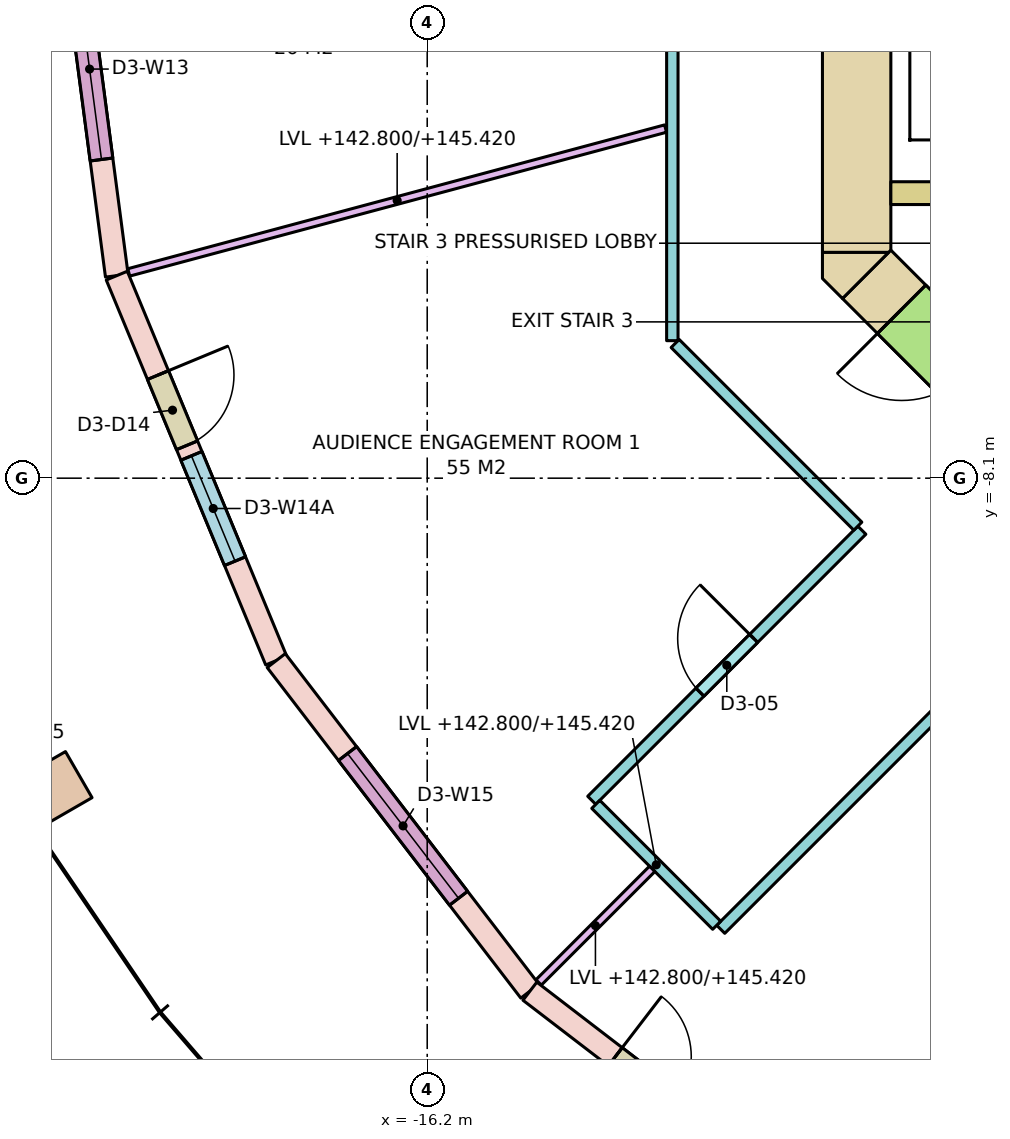
"""IFC4 building model, lengths in metres.
Left out: names, types, materials, properties, quantities, classifications, styles, units other than length and angle.
Written with IfcOpenShell. Run it as: python <this file> out.ifc"""

import sys

from ifc_helpers import new_model, si_unit, direction, frame, frame_2d, origin, origin_2d, place, context, subcontext, project, spatial, polyline, rectangle, outline, extrude, element, fill, save


model = new_model("IFC4")
c1 = context("Model", 3, precision=1e-05, world=origin(), true_north=direction((0.0, 1.0)))
c2 = subcontext(c1, "Body", "Model", "MODEL_VIEW")
j1 = project(units=[si_unit("LENGTHUNIT", "METRE"), si_unit("PLANEANGLEUNIT", "RADIAN")], contexts=[c1])
p1 = place(None, origin())
s1 = spatial("IfcSite", under=j1, at=p1, CompositionType="ELEMENT")
p2 = place(p1, origin())
s2 = spatial("IfcBuilding", under=s1, at=p2, CompositionType="ELEMENT")
p3 = place(p2, frame((0.0, 0.0, 142.8)))
s3 = spatial("IfcBuildingStorey", under=s2, at=p3, CompositionType="ELEMENT", Elevation=142.8)
p4 = place(p3, frame((-21.218, -12.25, 0.0), z_axis=(0.0, 0.0, 1.0), x_axis=(0.5, -0.866025403784, 0.0)))
e1 = element("IfcColumn", 1, at=p4, inside=s3, PredefinedType="COLUMN", context=c2, shape_type="SweptSolid", body=[
    extrude(rectangle(XDim=0.7, YDim=1.0, at=origin_2d()), origin(), (0.0, 0.0, 1.0), 3.8),
])
p5 = place(p3, frame((-10.55, -5.13, -0.28), z_axis=(0.0, 0.0, 1.0), x_axis=(0.0, 1.0, 0.0)))
e2 = element("IfcWall", 2, at=p5, inside=s3, PredefinedType="SHEAR", context=c2, shape_type="SweptSolid", body=[
    extrude(rectangle(XDim=10.26, YDim=0.9, at=frame_2d((5.13, 0.0))), origin(), (0.0, 0.0, 1.0), 3.8),
])
p6 = place(p5, frame((4.13, 0.0, 0.28)))
e3 = element("IfcOpeningElement", 3, at=p6, cuts=e2, PredefinedType="OPENING", context=c2, shape_type="SweptSolid", body=[
    extrude(rectangle(XDim=2.0, YDim=2.1, at=frame_2d((1.0, 1.05))), frame((0.0, 0.46, 0.0), z_axis=(0.0, -1.0, 0.0), x_axis=(1.0, 0.0, 0.0)), (0.0, 0.0, 1.0), 0.92),
])
p7 = place(p3, frame((-7.418, -8.418, -0.28), z_axis=(0.0, 0.0, 1.0), x_axis=(-0.707106781187, 0.707106781187, 0.0)))
e4 = element("IfcWall", 4, at=p7, inside=s3, PredefinedType="SHEAR", context=c2, shape_type="SweptSolid", body=[
    extrude(rectangle(XDim=4.243, YDim=0.9, at=frame_2d((2.121, 0.0))), origin(), (0.0, 0.0, 1.0), 3.8),
])
p8 = place(p7, frame((2.393, 0.0, 0.28)))
e5 = element("IfcOpeningElement", 5, at=p8, cuts=e4, PredefinedType="OPENING", context=c2, shape_type="SweptSolid", body=[
    extrude(rectangle(XDim=1.2, YDim=2.1, at=frame_2d((0.6, 1.05))), frame((0.0, 0.46, 0.0), z_axis=(0.0, -1.0, 0.0), x_axis=(1.0, 0.0, 0.0)), (0.0, 0.0, 1.0), 0.92),
])
p9 = place(p3, frame((0.0, 0.0, -0.28)))
e6 = element("IfcWall", 6, at=p9, inside=s3, PredefinedType="SHEAR", context=c2, shape_type="SweptSolid", body=[
    extrude(outline(polyline([(-11.0, -5.473), (-11.0, -5.13), (-10.13, -5.13), (-10.736, -5.736), (-11.0, -5.473)])), origin(), (0.0, 0.0, 1.0), 3.8),
])
p10 = place(p3, frame((-10.1, -4.35, 0.0), z_axis=(0.0, 0.0, 1.0), x_axis=(1.0, 0.0, 0.0)))
e7 = element("IfcWall", 7, at=p10, inside=s3, PredefinedType="SOLIDWALL", context=c2, shape_type="SweptSolid", body=[
    extrude(rectangle(XDim=8.1, YDim=0.3, at=frame_2d((4.05, 0.0))), origin(), (0.0, 0.0, 1.0), 3.52),
])
p11 = place(p3, frame((-21.0, 0.0, 0.0), z_axis=(0.0, 0.0, 1.0), x_axis=(0.130527087244, -0.991444743541, 0.0)))
e8 = element("IfcWall", 8, at=p11, inside=s3, PredefinedType="STANDARD", context=c2, shape_type="SweptSolid", body=[
    extrude(rectangle(XDim=5.482, YDim=0.3, at=frame_2d((2.741, 0.0))), origin(), (0.0, 0.0, 1.0), 3.52),
])
p12 = place(p11, frame((1.541, 0.0, 0.8)))
e9 = element("IfcOpeningElement", 9, at=p12, cuts=e8, PredefinedType="OPENING", context=c2, shape_type="SweptSolid", body=[
    extrude(rectangle(XDim=2.4, YDim=2.5, at=frame_2d((1.2, 1.25))), frame((0.0, 0.16, 0.0), z_axis=(0.0, -1.0, 0.0), x_axis=(1.0, 0.0, 0.0)), (0.0, 0.0, 1.0), 0.32),
])
p13 = place(p3, frame((-20.284, -5.435, 0.0), z_axis=(0.0, 0.0, 1.0), x_axis=(0.382688740813, -0.923877333662, 0.0)))
e10 = element("IfcWall", 10, at=p13, inside=s3, PredefinedType="STANDARD", context=c2, shape_type="SweptSolid", body=[
    extrude(rectangle(XDim=5.482, YDim=0.3, at=frame_2d((2.741, 0.0))), origin(), (0.0, 0.0, 1.0), 3.52),
])
p14 = place(p13, frame((1.416, 0.0, 0.0)))
e11 = element("IfcOpeningElement", 11, at=p14, cuts=e10, PredefinedType="OPENING", context=c2, shape_type="SweptSolid", body=[
    extrude(rectangle(XDim=1.0, YDim=2.4, at=frame_2d((0.5, 1.2))), frame((0.0, 0.16, 0.0), z_axis=(0.0, -1.0, 0.0), x_axis=(1.0, 0.0, 0.0)), (0.0, 0.0, 1.0), 0.32),
])
p15 = place(p13, frame((2.566, 0.0, 0.8)))
e12 = element("IfcOpeningElement", 12, at=p15, cuts=e10, PredefinedType="OPENING", context=c2, shape_type="SweptSolid", body=[
    extrude(rectangle(XDim=1.5, YDim=2.5, at=frame_2d((0.75, 1.25))), frame((0.0, 0.16, 0.0), z_axis=(0.0, -1.0, 0.0), x_axis=(1.0, 0.0, 0.0)), (0.0, 0.0, 1.0), 0.32),
])
p16 = place(p3, frame((-18.187, -10.5, 0.0), z_axis=(0.0, 0.0, 1.0), x_axis=(0.608784891166, -0.793335336593, 0.0)))
e13 = element("IfcWall", 13, at=p16, inside=s3, PredefinedType="STANDARD", context=c2, shape_type="SweptSolid", body=[
    extrude(rectangle(XDim=5.482, YDim=0.3, at=frame_2d((2.741, 0.0))), origin(), (0.0, 0.0, 1.0), 3.52),
])
p17 = place(p16, frame((1.541, 0.0, 0.8)))
e14 = element("IfcOpeningElement", 14, at=p17, cuts=e13, PredefinedType="OPENING", context=c2, shape_type="SweptSolid", body=[
    extrude(rectangle(XDim=2.4, YDim=2.5, at=frame_2d((1.2, 1.25))), frame((0.0, 0.16, 0.0), z_axis=(0.0, -1.0, 0.0), x_axis=(1.0, 0.0, 0.0)), (0.0, 0.0, 1.0), 0.32),
])
p18 = place(p3, frame((-14.849, -14.849, 0.0), z_axis=(0.0, 0.0, 1.0), x_axis=(0.793335336593, -0.608784891166, 0.0)))
e15 = element("IfcWall", 15, at=p18, inside=s3, PredefinedType="STANDARD", context=c2, shape_type="SweptSolid", body=[
    extrude(rectangle(XDim=5.482, YDim=0.3, at=frame_2d((2.741, 0.0))), origin(), (0.0, 0.0, 1.0), 3.52),
])
p19 = place(p18, frame((1.416, 0.0, 0.0)))
e16 = element("IfcOpeningElement", 16, at=p19, cuts=e15, PredefinedType="OPENING", context=c2, shape_type="SweptSolid", body=[
    extrude(rectangle(XDim=1.0, YDim=2.4, at=frame_2d((0.5, 1.2))), frame((0.0, 0.16, 0.0), z_axis=(0.0, -1.0, 0.0), x_axis=(1.0, 0.0, 0.0)), (0.0, 0.0, 1.0), 0.32),
])
p20 = place(p18, frame((2.566, 0.0, 0.8)))
e17 = element("IfcOpeningElement", 17, at=p20, cuts=e15, PredefinedType="OPENING", context=c2, shape_type="SweptSolid", body=[
    extrude(rectangle(XDim=1.5, YDim=2.5, at=frame_2d((0.75, 1.25))), frame((0.0, 0.16, 0.0), z_axis=(0.0, -1.0, 0.0), x_axis=(1.0, 0.0, 0.0)), (0.0, 0.0, 1.0), 0.32),
])
p21 = place(p3, frame((-14.035, -12.338, 0.0), z_axis=(0.0, 0.0, 1.0), x_axis=(0.707106781187, 0.707106781187, 0.0)))
e18 = element("IfcWall", 18, at=p21, inside=s3, PredefinedType="PARTITIONING", context=c2, shape_type="SweptSolid", body=[
    extrude(rectangle(XDim=5.026, YDim=0.15, at=frame_2d((2.513, 0.0))), origin(), (0.0, 0.0, 1.0), 3.52),
])
p22 = place(p21, frame((2.013, 0.0, 0.0)))
e19 = element("IfcOpeningElement", 19, at=p22, cuts=e18, PredefinedType="OPENING", context=c2, shape_type="SweptSolid", body=[
    extrude(rectangle(XDim=1.0, YDim=2.1, at=frame_2d((0.5, 1.05))), frame((0.0, 0.085, 0.0), z_axis=(0.0, -1.0, 0.0), x_axis=(1.0, 0.0, 0.0)), (0.0, 0.0, 1.0), 0.17),
])
p23 = place(p3, frame((-10.534, -8.731, 0.0), z_axis=(0.0, 0.0, 1.0), x_axis=(-0.707106781187, 0.707106781187, 0.0)))
e20 = element("IfcWall", 20, at=p23, inside=s3, PredefinedType="PARTITIONING", context=c2, shape_type="SweptSolid", body=[
    extrude(rectangle(XDim=3.399, YDim=0.15, at=frame_2d((1.7, 0.0))), origin(), (0.0, 0.0, 1.0), 2.62),
])
p24 = place(p3, frame((-12.975, -6.291, 0.0), z_axis=(0.0, 0.0, 1.0), x_axis=(0.0, 1.0, 0.0)))
e21 = element("IfcWall", 21, at=p24, inside=s3, PredefinedType="PARTITIONING", context=c2, shape_type="SweptSolid", body=[
    extrude(rectangle(XDim=5.016, YDim=0.15, at=frame_2d((2.508, 0.0))), origin(), (0.0, 0.0, 1.0), 2.62),
])
p25 = place(p3, frame((-8.784, -10.481, 0.0), z_axis=(0.0, 0.0, 1.0), x_axis=(-0.707106781187, -0.707106781187, 0.0)))
e22 = element("IfcWall", 22, at=p25, inside=s3, PredefinedType="PARTITIONING", context=c2, shape_type="SweptSolid", body=[
    extrude(rectangle(XDim=5.026, YDim=0.15, at=frame_2d((2.513, 0.0))), origin(), (0.0, 0.0, 1.0), 3.52),
])
p26 = place(p3, frame((-12.391, -13.982, 0.0), z_axis=(0.0, 0.0, 1.0), x_axis=(-0.707106781187, 0.707106781187, 0.0)))
e23 = element("IfcWall", 23, at=p26, inside=s3, PredefinedType="PARTITIONING", context=c2, shape_type="SweptSolid", body=[
    extrude(rectangle(XDim=2.25, YDim=0.15, at=frame_2d((1.125, 0.0))), origin(), (0.0, 0.0, 1.0), 2.62),
])
p27 = place(p3, frame((-13.064, -3.5, 0.0), z_axis=(0.0, 0.0, 1.0), x_axis=(-0.965927781613, -0.258811747624, 0.0)))
e24 = element("IfcWall", 24, at=p27, inside=s3, PredefinedType="PARTITIONING", context=c2, shape_type="SweptSolid", body=[
    extrude(rectangle(XDim=7.312, YDim=0.1, at=frame_2d((3.656, 0.0))), origin(), (0.0, 0.0, 1.0), 2.62),
])
p28 = place(p3, frame((-13.24, -13.24, 0.0), z_axis=(0.0, 0.0, 1.0), x_axis=(-0.707106781187, -0.707106781187, 0.0)))
e25 = element("IfcWall", 25, at=p28, inside=s3, PredefinedType="PARTITIONING", context=c2, shape_type="SweptSolid", body=[
    extrude(rectangle(XDim=2.113, YDim=0.1, at=frame_2d((1.057, 0.0))), origin(), (0.0, 0.0, 1.0), 2.62),
])
p29 = place(p12, origin())
e26 = element("IfcWindow", 26, at=p29, inside=s3, PartitioningType="SINGLE_PANEL", PredefinedType="WINDOW", context=c2, shape_type="SweptSolid", body=[
    extrude(rectangle(XDim=2.4, YDim=2.5, at=frame_2d((1.2, 1.25))), frame((0.0, 0.03, 0.0), z_axis=(0.0, -1.0, 0.0), x_axis=(1.0, 0.0, 0.0)), (0.0, 0.0, 1.0), 0.06),
])
fill(e9, e26)
p30 = place(p14, origin())
e27 = element("IfcDoor", 27, at=p30, inside=s3, OperationType="SINGLE_SWING_LEFT", PredefinedType="DOOR", context=c2, shape_type="SweptSolid", body=[
    extrude(rectangle(XDim=1.0, YDim=2.4, at=frame_2d((0.5, 1.2))), frame((0.0, 0.025, 0.0), z_axis=(0.0, -1.0, 0.0), x_axis=(1.0, 0.0, 0.0)), (0.0, 0.0, 1.0), 0.05),
])
fill(e11, e27)
p31 = place(p15, origin())
e28 = element("IfcWindow", 28, at=p31, inside=s3, PartitioningType="SINGLE_PANEL", PredefinedType="WINDOW", context=c2, shape_type="SweptSolid", body=[
    extrude(rectangle(XDim=1.5, YDim=2.5, at=frame_2d((0.75, 1.25))), frame((0.0, 0.03, 0.0), z_axis=(0.0, -1.0, 0.0), x_axis=(1.0, 0.0, 0.0)), (0.0, 0.0, 1.0), 0.06),
])
fill(e12, e28)
p32 = place(p17, origin())
e29 = element("IfcWindow", 29, at=p32, inside=s3, PartitioningType="SINGLE_PANEL", PredefinedType="WINDOW", context=c2, shape_type="SweptSolid", body=[
    extrude(rectangle(XDim=2.4, YDim=2.5, at=frame_2d((1.2, 1.25))), frame((0.0, 0.03, 0.0), z_axis=(0.0, -1.0, 0.0), x_axis=(1.0, 0.0, 0.0)), (0.0, 0.0, 1.0), 0.06),
])
fill(e14, e29)
p33 = place(p19, origin())
e30 = element("IfcDoor", 30, at=p33, inside=s3, OperationType="SINGLE_SWING_LEFT", PredefinedType="DOOR", context=c2, shape_type="SweptSolid", body=[
    extrude(rectangle(XDim=1.0, YDim=2.4, at=frame_2d((0.5, 1.2))), frame((0.0, 0.025, 0.0), z_axis=(0.0, -1.0, 0.0), x_axis=(1.0, 0.0, 0.0)), (0.0, 0.0, 1.0), 0.05),
])
fill(e16, e30)
p34 = place(p8, origin())
e31 = element("IfcDoor", 31, at=p34, inside=s3, OperationType="SINGLE_SWING_RIGHT", PredefinedType="DOOR", context=c2, shape_type="SweptSolid", body=[
    extrude(rectangle(XDim=1.2, YDim=2.1, at=frame_2d((0.6, 1.05))), frame((0.0, 0.025, 0.0), z_axis=(0.0, -1.0, 0.0), x_axis=(1.0, 0.0, 0.0)), (0.0, 0.0, 1.0), 0.05),
])
fill(e5, e31)
p35 = place(p22, origin())
e32 = element("IfcDoor", 32, at=p35, inside=s3, OperationType="SINGLE_SWING_RIGHT", PredefinedType="DOOR", context=c2, shape_type="SweptSolid", body=[
    extrude(rectangle(XDim=1.0, YDim=2.1, at=frame_2d((0.5, 1.05))), frame((0.0, 0.025, 0.0), z_axis=(0.0, -1.0, 0.0), x_axis=(1.0, 0.0, 0.0)), (0.0, 0.0, 1.0), 0.05),
])
fill(e19, e32)
save(model, sys.argv[1])
